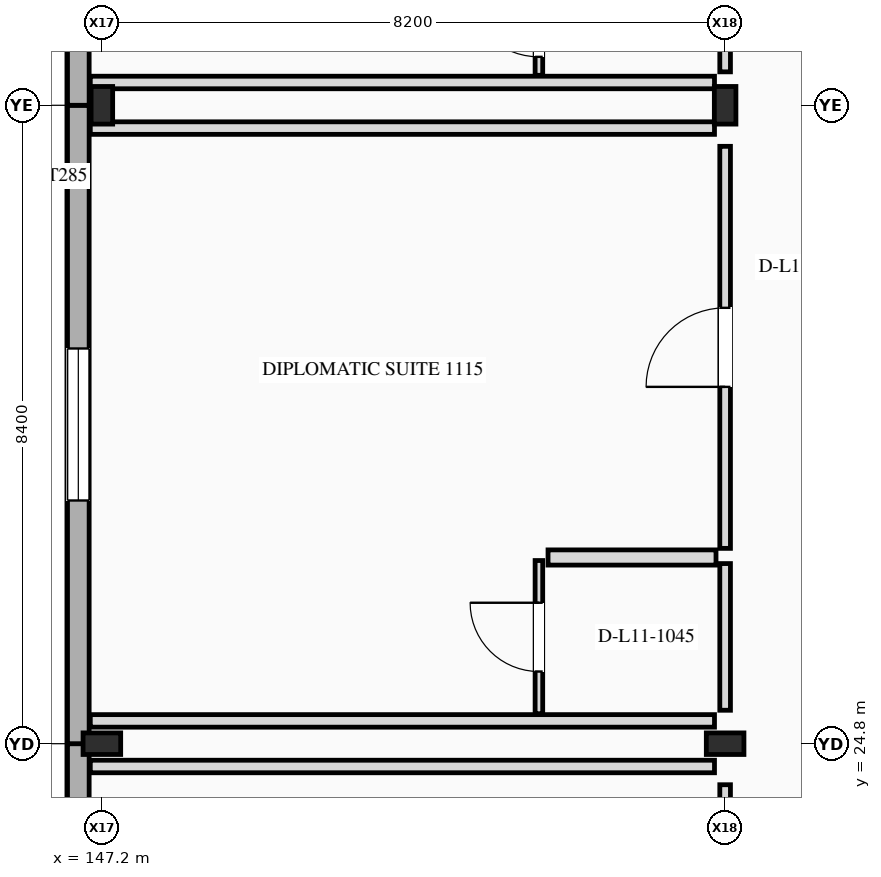
"""IFC4 building model, lengths in metres.
Left out: names, types, materials, properties, quantities, classifications, styles, units other than length and angle.
Written with IfcOpenShell. Run it as: python <this file> out.ifc"""

import sys

from ifc_helpers import new_model, si_unit, direction, frame, frame_2d, origin, origin_2d, place, context, subcontext, project, spatial, rectangle, i_section, extrude, element, fill, save


model = new_model("IFC4")
c1 = context("Model", 3, precision=1e-05, world=origin(), true_north=direction((0.0, 1.0)))
c2 = subcontext(c1, "Body", "Model", "MODEL_VIEW")
j1 = project(units=[si_unit("LENGTHUNIT", "METRE"), si_unit("PLANEANGLEUNIT", "RADIAN")], contexts=[c1])
p1 = place(None, origin())
s1 = spatial("IfcSite", under=j1, at=p1, CompositionType="ELEMENT")
p2 = place(p1, origin())
s2 = spatial("IfcBuilding", under=s1, at=p2, CompositionType="ELEMENT")
p3 = place(p2, frame((0.0, 0.0, 44.6)))
s3 = spatial("IfcBuildingStorey", under=s2, at=p3, CompositionType="ELEMENT", Elevation=44.6)
for number, where, z_axis, x_axis in (
    (1, (147.2, 24.8, 0.0), (0.0, 0.0, 1.0), (0.0, 1.0, 0.0)),
    (2, (147.2, 33.2, 0.0), (0.0, 0.0, 1.0), (1.0, 0.0, 0.0)),
    (3, (155.4, 24.8, 0.0), (0.0, 0.0, 1.0), (0.0, 1.0, 0.0)),
    (4, (155.4, 33.2, 0.0), (0.0, 0.0, 1.0), (1.0, 0.0, 0.0)),
):
    element("IfcColumn", number, at=place(p3, frame(where, z_axis=z_axis, x_axis=x_axis)), inside=s3, PredefinedType="COLUMN", context=c2, shape_type="SweptSolid", body=[
        extrude(i_section(OverallWidth=0.284, OverallDepth=0.495, WebThickness=0.019, FlangeThickness=0.033, at=origin_2d()), origin(), (0.0, 0.0, 1.0), 3.6),
    ])
p4 = place(p3, frame((146.89, 19.254, 0.0), z_axis=(0.0, 0.0, 1.0), x_axis=(0.0, 1.0, 0.0)))
e5 = element("IfcWall", 5, at=p4, inside=s3, PredefinedType="STANDARD", context=c2, shape_type="SweptSolid", body=[
    extrude(rectangle(XDim=5.546, YDim=0.285, at=frame_2d((2.773, 0.0))), origin(), (0.0, 0.0, 1.0), 3.6),
])
p5 = place(p4, frame((1.598, 0.0, 0.85)))
e6 = element("IfcOpeningElement", 6, at=p5, cuts=e5, PredefinedType="OPENING", context=c2, shape_type="SweptSolid", body=[
    extrude(rectangle(XDim=2.0, YDim=1.65, at=frame_2d((1.0, 0.825))), frame((0.0, 0.152, 0.0), z_axis=(0.0, -1.0, 0.0), x_axis=(1.0, 0.0, 0.0)), (0.0, 0.0, 1.0), 0.305),
])
p6 = place(p3, frame((146.89, 24.8, 0.0), z_axis=(0.0, 0.0, 1.0), x_axis=(0.0, 1.0, 0.0)))
e7 = element("IfcWall", 7, at=p6, inside=s3, PredefinedType="STANDARD", context=c2, shape_type="SweptSolid", body=[
    extrude(rectangle(XDim=8.4, YDim=0.285, at=frame_2d((4.2, 0.0))), origin(), (0.0, 0.0, 1.0), 3.6),
])
p7 = place(p6, frame((3.2, 0.0, 0.85)))
e8 = element("IfcOpeningElement", 8, at=p7, cuts=e7, PredefinedType="OPENING", context=c2, shape_type="SweptSolid", body=[
    extrude(rectangle(XDim=2.0, YDim=1.65, at=frame_2d((1.0, 0.825))), frame((0.0, 0.152, 0.0), z_axis=(0.0, -1.0, 0.0), x_axis=(1.0, 0.0, 0.0)), (0.0, 0.0, 1.0), 0.305),
])
p8 = place(p3, frame((146.89, 33.2, 0.0), z_axis=(0.0, 0.0, 1.0), x_axis=(0.0, 1.0, 0.0)))
e9 = element("IfcWall", 9, at=p8, inside=s3, PredefinedType="STANDARD", context=c2, shape_type="SweptSolid", body=[
    extrude(rectangle(XDim=8.4, YDim=0.285, at=frame_2d((4.2, 0.0))), origin(), (0.0, 0.0, 1.0), 3.6),
])
p9 = place(p3, frame((155.4, 21.37, 0.0), z_axis=(0.0, 0.0, 1.0), x_axis=(0.0, 1.0, 0.0)))
e10 = element("IfcWall", 10, at=p9, inside=s3, PredefinedType="PARTITIONING", context=c2, shape_type="SweptSolid", body=[
    extrude(rectangle(XDim=2.89, YDim=0.14, at=frame_2d((1.445, 0.0))), origin(), (0.0, 0.0, 1.0), 2.774),
])
p10 = place(p9, frame((0.955, 0.0, 0.0)))
e11 = element("IfcOpeningElement", 11, at=p10, cuts=e10, PredefinedType="OPENING", context=c2, shape_type="SweptSolid", body=[
    extrude(rectangle(XDim=0.98, YDim=2.2, at=frame_2d((0.49, 1.1))), frame((0.0, 0.08, 0.0), z_axis=(0.0, -1.0, 0.0), x_axis=(1.0, 0.0, 0.0)), (0.0, 0.0, 1.0), 0.16),
])
p11 = place(p3, frame((147.048, 24.5, 0.0), z_axis=(0.0, 0.0, 1.0), x_axis=(1.0, 0.0, 0.0)))
e12 = element("IfcWall", 12, at=p11, inside=s3, PredefinedType="PARTITIONING", context=c2, shape_type="SweptSolid", body=[
    extrude(rectangle(XDim=8.212, YDim=0.165, at=frame_2d((4.106, 0.0))), origin(), (0.0, 0.0, 1.0), 2.713),
])
p12 = place(p3, frame((155.4, 25.24, 0.0), z_axis=(0.0, 0.0, 1.0), x_axis=(0.0, 1.0, 0.0)))
e13 = element("IfcWall", 13, at=p12, inside=s3, PredefinedType="PARTITIONING", context=c2, shape_type="SweptSolid", body=[
    extrude(rectangle(XDim=1.93, YDim=0.14, at=frame_2d((0.965, 0.0))), origin(), (0.0, 0.0, 1.0), 2.774),
])
p13 = place(p3, frame((155.4, 27.37, 0.0), z_axis=(0.0, 0.0, 1.0), x_axis=(0.0, 1.0, 0.0)))
e14 = element("IfcWall", 14, at=p13, inside=s3, PredefinedType="PARTITIONING", context=c2, shape_type="SweptSolid", body=[
    extrude(rectangle(XDim=5.29, YDim=0.14, at=frame_2d((2.645, 0.0))), origin(), (0.0, 0.0, 1.0), 2.774),
])
p14 = place(p13, frame((2.125, 0.0, 0.0)))
e15 = element("IfcOpeningElement", 15, at=p14, cuts=e14, PredefinedType="OPENING", context=c2, shape_type="SweptSolid", body=[
    extrude(rectangle(XDim=1.04, YDim=2.25, at=frame_2d((0.52, 1.125))), frame((0.0, 0.08, 0.0), z_axis=(0.0, -1.0, 0.0), x_axis=(1.0, 0.0, 0.0)), (0.0, 0.0, 1.0), 0.16),
])
for number, where, z_axis, x_axis in (
    (16, (147.048, 25.1, 0.0), (0.0, 0.0, 1.0), (1.0, 0.0, 0.0)),
    (17, (147.048, 32.9, 0.0), (0.0, 0.0, 1.0), (1.0, 0.0, 0.0)),
):
    element("IfcWall", number, at=place(p3, frame(where, z_axis=z_axis, x_axis=x_axis)), inside=s3, PredefinedType="PARTITIONING", context=c2, shape_type="SweptSolid", body=[
        extrude(rectangle(XDim=8.212, YDim=0.165, at=frame_2d((4.106, 0.0))), origin(), (0.0, 0.0, 1.0), 2.713),
    ])
p15 = place(p3, frame((153.07, 27.25, 0.0), z_axis=(0.0, 0.0, 1.0), x_axis=(1.0, 0.0, 0.0)))
e18 = element("IfcWall", 18, at=p15, inside=s3, PredefinedType="PLUMBINGWALL", context=c2, shape_type="SweptSolid", body=[
    extrude(rectangle(XDim=2.21, YDim=0.2, at=frame_2d((1.105, 0.0))), origin(), (0.0, 0.0, 1.0), 3.3),
])
p16 = place(p3, frame((152.95, 25.195, 0.0), z_axis=(0.0, 0.0, 1.0), x_axis=(0.0, 1.0, 0.0)))
e19 = element("IfcWall", 19, at=p16, inside=s3, PredefinedType="PARTITIONING", context=c2, shape_type="SweptSolid", body=[
    extrude(rectangle(XDim=2.015, YDim=0.1, at=frame_2d((1.008, 0.0))), origin(), (0.0, 0.0, 1.0), 2.908),
])
p17 = place(p16, frame((0.555, 0.0, 0.0)))
e20 = element("IfcOpeningElement", 20, at=p17, cuts=e19, PredefinedType="OPENING", context=c2, shape_type="SweptSolid", body=[
    extrude(rectangle(XDim=0.905, YDim=2.1, at=frame_2d((0.453, 1.05))), frame((0.0, 0.06, 0.0), z_axis=(0.0, -1.0, 0.0), x_axis=(1.0, 0.0, 0.0)), (0.0, 0.0, 1.0), 0.12),
])
p18 = place(p3, frame((155.4, 33.64, 0.0), z_axis=(0.0, 0.0, 1.0), x_axis=(0.0, 1.0, 0.0)))
e21 = element("IfcWall", 21, at=p18, inside=s3, PredefinedType="PARTITIONING", context=c2, shape_type="SweptSolid", body=[
    extrude(rectangle(XDim=1.355, YDim=0.14, at=frame_2d((0.678, 0.0))), origin(), (0.0, 0.0, 1.0), 3.3),
])
p19 = place(p3, frame((147.048, 33.5, 0.0), z_axis=(0.0, 0.0, 1.0), x_axis=(1.0, 0.0, 0.0)))
e22 = element("IfcWall", 22, at=p19, inside=s3, PredefinedType="PARTITIONING", context=c2, shape_type="SweptSolid", body=[
    extrude(rectangle(XDim=8.212, YDim=0.165, at=frame_2d((4.106, 0.0))), origin(), (0.0, 0.0, 1.0), 2.713),
])
p20 = place(p3, frame((152.95, 33.594, 0.0), z_axis=(0.0, 0.0, 1.0), x_axis=(0.0, 1.0, 0.0)))
e23 = element("IfcWall", 23, at=p20, inside=s3, PredefinedType="PARTITIONING", context=c2, shape_type="SweptSolid", body=[
    extrude(rectangle(XDim=1.44, YDim=0.1, at=frame_2d((0.72, 0.0))), origin(), (0.0, 0.0, 1.0), 3.3),
])
p21 = place(p20, frame((0.243, 0.0, 0.0)))
e24 = element("IfcOpeningElement", 24, at=p21, cuts=e23, PredefinedType="OPENING", context=c2, shape_type="SweptSolid", body=[
    extrude(rectangle(XDim=0.955, YDim=2.14, at=frame_2d((0.478, 1.07))), frame((0.0, 0.06, 0.0), z_axis=(0.0, -1.0, 0.0), x_axis=(1.0, 0.0, 0.0)), (0.0, 0.0, 1.0), 0.12),
])
p22 = place(p7, origin())
e25 = element("IfcWindow", 25, at=p22, inside=s3, PartitioningType="SINGLE_PANEL", PredefinedType="WINDOW", context=c2, shape_type="SweptSolid", body=[
    extrude(rectangle(XDim=2.0, YDim=1.65, at=frame_2d((1.0, 0.825))), frame((0.0, 0.03, 0.0), z_axis=(0.0, -1.0, 0.0), x_axis=(1.0, 0.0, 0.0)), (0.0, 0.0, 1.0), 0.06),
])
fill(e8, e25)
p23 = place(p14, origin())
e26 = element("IfcDoor", 26, at=p23, inside=s3, OperationType="SINGLE_SWING_LEFT", PredefinedType="DOOR", context=c2, shape_type="SweptSolid", body=[
    extrude(rectangle(XDim=1.04, YDim=2.25, at=frame_2d((0.52, 1.125))), frame((0.0, 0.025, 0.0), z_axis=(0.0, -1.0, 0.0), x_axis=(1.0, 0.0, 0.0)), (0.0, 0.0, 1.0), 0.05),
])
fill(e15, e26)
p24 = place(p17, origin())
e27 = element("IfcDoor", 27, at=p24, inside=s3, OperationType="SINGLE_SWING_RIGHT", PredefinedType="DOOR", context=c2, shape_type="SweptSolid", body=[
    extrude(rectangle(XDim=0.905, YDim=2.1, at=frame_2d((0.453, 1.05))), frame((0.0, 0.025, 0.0), z_axis=(0.0, -1.0, 0.0), x_axis=(1.0, 0.0, 0.0)), (0.0, 0.0, 1.0), 0.05),
])
fill(e20, e27)
p25 = place(p21, origin())
e28 = element("IfcDoor", 28, at=p25, inside=s3, OperationType="SINGLE_SWING_RIGHT", PredefinedType="DOOR", context=c2, shape_type="SweptSolid", body=[
    extrude(rectangle(XDim=0.955, YDim=2.14, at=frame_2d((0.478, 1.07))), frame((0.0, 0.025, 0.0), z_axis=(0.0, -1.0, 0.0), x_axis=(1.0, 0.0, 0.0)), (0.0, 0.0, 1.0), 0.05),
])
fill(e24, e28)
save(model, sys.argv[1])
